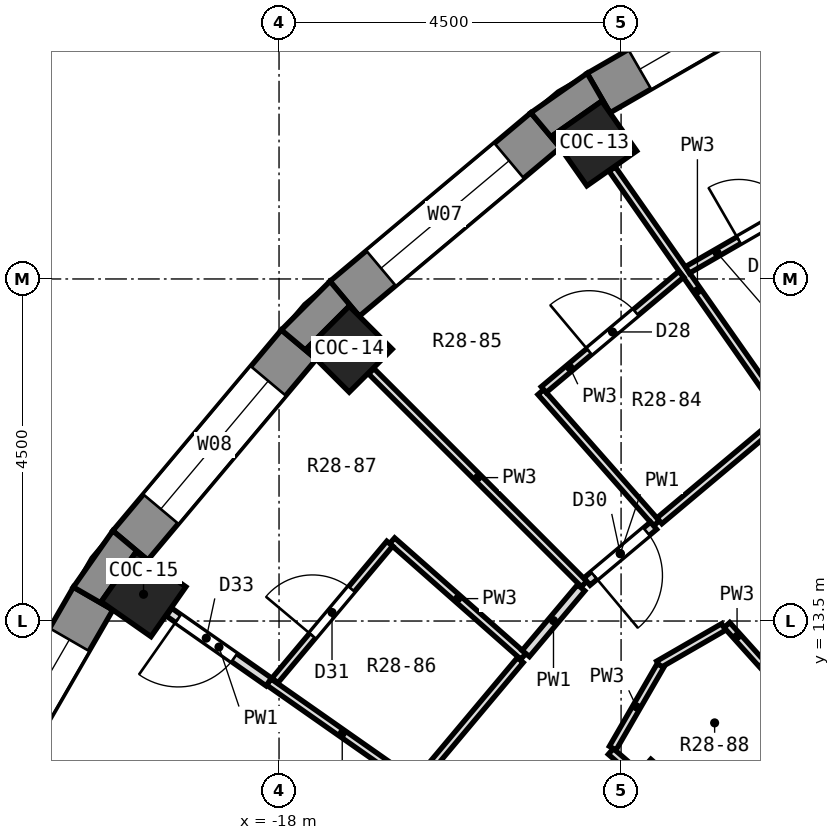
"""IFC4 building model, lengths in metres.
Left out: names, types, materials, properties, quantities, classifications, styles, units other than length and angle.
Written with IfcOpenShell. Run it as: python <this file> out.ifc"""

import sys

from ifc_helpers import new_model, si_unit, direction, frame, frame_2d, origin, origin_2d, place, context, subcontext, project, spatial, polyline, rectangle, outline, extrude, element, fill, save


model = new_model("IFC4")
c1 = context("Model", 3, precision=1e-05, world=origin(), true_north=direction((0.0, 1.0)))
c2 = subcontext(c1, "Body", "Model", "MODEL_VIEW")
j1 = project(units=[si_unit("LENGTHUNIT", "METRE"), si_unit("PLANEANGLEUNIT", "RADIAN")], contexts=[c1])
p1 = place(None, origin())
s1 = spatial("IfcSite", under=j1, at=p1, CompositionType="ELEMENT")
p2 = place(p1, origin())
s2 = spatial("IfcBuilding", under=s1, at=p2, CompositionType="ELEMENT")
p3 = place(p2, frame((0.0, 0.0, 190.5)))
s3 = spatial("IfcBuildingStorey", under=s2, at=p3, CompositionType="ELEMENT", Elevation=190.5)
for number, where, z_axis, x_axis in (
    (1, (-13.852, 19.782, 0.0), (0.0, 0.0, 1.0), (-0.574, 0.819, 0.0)),
    (2, (-17.077, 17.077, 0.0), (0.0, 0.0, 1.0), (-0.707, 0.707, 0.0)),
    (3, (-19.782, 13.852, 0.0), (0.0, 0.0, 1.0), (-0.819, 0.574, 0.0)),
):
    element("IfcColumn", number, at=place(p3, frame(where, z_axis=z_axis, x_axis=x_axis)), inside=s3, PredefinedType="COLUMN", context=c2, shape_type="SweptSolid", body=[
        extrude(rectangle(XDim=0.8, YDim=0.8, at=origin_2d()), origin(), (0.0, 0.0, 1.0), 3.3),
    ])
p4 = place(p3, frame((-10.809, 22.171, 0.0), z_axis=(0.0, 0.0, 1.0), x_axis=(-0.86602648383, -0.499998129301, 0.0)))
e4 = element("IfcWall", 4, at=p4, inside=s3, PredefinedType="SOLIDWALL", context=c2, shape_type="SweptSolid", body=[
    extrude(rectangle(XDim=3.45, YDim=0.6, at=frame_2d((1.725, 0.0))), origin(), (0.0, 0.0, 1.0), 2.85),
])
p5 = place(p4, frame((0.625, 0.0, 0.9)))
e5 = element("IfcOpeningElement", 5, at=p5, cuts=e4, PredefinedType="OPENING", context=c2, shape_type="SweptSolid", body=[
    extrude(rectangle(XDim=2.2, YDim=1.8, at=frame_2d((1.1, 0.9))), frame((0.0, 0.312, 0.0), z_axis=(0.0, -1.0, 0.0), x_axis=(1.0, 0.0, 0.0)), (0.0, 0.0, 1.0), 0.624),
])
p6 = place(p3, frame((-14.494, 19.957, 0.0), z_axis=(0.0, 0.0, 1.0), x_axis=(-0.766058884809, -0.642770398358, 0.0)))
e6 = element("IfcWall", 6, at=p6, inside=s3, PredefinedType="SOLIDWALL", context=c2, shape_type="SweptSolid", body=[
    extrude(rectangle(XDim=3.449, YDim=0.6, at=frame_2d((1.725, 0.0))), origin(), (0.0, 0.0, 1.0), 2.85),
])
p7 = place(p6, frame((0.625, 0.0, 0.9)))
e7 = element("IfcOpeningElement", 7, at=p7, cuts=e6, PredefinedType="OPENING", context=c2, shape_type="SweptSolid", body=[
    extrude(rectangle(XDim=2.2, YDim=1.8, at=frame_2d((1.1, 0.9))), frame((0.0, 0.312, 0.0), z_axis=(0.0, -1.0, 0.0), x_axis=(1.0, 0.0, 0.0)), (0.0, 0.0, 1.0), 0.624),
])
p8 = place(p3, frame((-17.74, 17.137, 0.0), z_axis=(0.0, 0.0, 1.0), x_axis=(-0.642770398358, -0.766058884809, 0.0)))
e8 = element("IfcWall", 8, at=p8, inside=s3, PredefinedType="SOLIDWALL", context=c2, shape_type="SweptSolid", body=[
    extrude(rectangle(XDim=3.449, YDim=0.6, at=frame_2d((1.725, 0.0))), origin(), (0.0, 0.0, 1.0), 2.85),
])
p9 = place(p8, frame((0.625, 0.0, 0.9)))
e9 = element("IfcOpeningElement", 9, at=p9, cuts=e8, PredefinedType="OPENING", context=c2, shape_type="SweptSolid", body=[
    extrude(rectangle(XDim=2.2, YDim=1.8, at=frame_2d((1.1, 0.9))), frame((0.0, 0.312, 0.0), z_axis=(0.0, -1.0, 0.0), x_axis=(1.0, 0.0, 0.0)), (0.0, 0.0, 1.0), 0.624),
])
p10 = place(p3, frame((-20.446, 13.796, 0.0), z_axis=(0.0, 0.0, 1.0), x_axis=(-0.499998129301, -0.86602648383, 0.0)))
e10 = element("IfcWall", 10, at=p10, inside=s3, PredefinedType="SOLIDWALL", context=c2, shape_type="SweptSolid", body=[
    extrude(rectangle(XDim=3.45, YDim=0.6, at=frame_2d((1.725, 0.0))), origin(), (0.0, 0.0, 1.0), 2.85),
])
p11 = place(p10, frame((0.625, 0.0, 0.9)))
e11 = element("IfcOpeningElement", 11, at=p11, cuts=e10, PredefinedType="OPENING", context=c2, shape_type="SweptSolid", body=[
    extrude(rectangle(XDim=2.2, YDim=1.8, at=frame_2d((1.1, 0.9))), frame((0.0, 0.312, 0.0), z_axis=(0.0, -1.0, 0.0), x_axis=(1.0, 0.0, 0.0)), (0.0, 0.0, 1.0), 0.624),
])
p12 = place(p3, origin())
e12 = element("IfcWall", 12, at=p12, inside=s3, PredefinedType="SOLIDWALL", context=c2, shape_type="SweptSolid", body=[
    extrude(outline(polyline([(-13.946, 20.706), (-14.687, 20.187), (-14.302, 19.727), (-14.409, 19.881), (-13.754, 20.34), (-13.646, 20.186), (-13.946, 20.706)])), origin(), (0.0, 0.0, 1.0), 2.85),
])
p13 = place(p3, origin())
e13 = element("IfcWall", 13, at=p13, inside=s3, PredefinedType="SOLIDWALL", context=c2, shape_type="SweptSolid", body=[
    extrude(outline(polyline([(-17.969, 17.33), (-17.51, 16.944), (-17.642, 17.077), (-17.077, 17.642), (-16.944, 17.51), (-17.33, 17.969), (-17.969, 17.33)])), origin(), (0.0, 0.0, 1.0), 2.85),
])
p14 = place(p3, origin())
e14 = element("IfcWall", 14, at=p14, inside=s3, PredefinedType="SOLIDWALL", context=c2, shape_type="SweptSolid", body=[
    extrude(outline(polyline([(-20.187, 14.687), (-20.706, 13.946), (-20.186, 13.646), (-20.34, 13.754), (-19.881, 14.409), (-19.727, 14.302), (-20.187, 14.687)])), origin(), (0.0, 0.0, 1.0), 2.85),
])
p15 = place(p3, frame((-13.617, 19.447, 0.0), z_axis=(0.0, 0.0, 1.0), x_axis=(0.573546149397, -0.819173250608, 0.0)))
e15 = element("IfcWall", 15, at=p15, inside=s3, PredefinedType="PARTITIONING", context=c2, shape_type="SweptSolid", body=[
    extrude(rectangle(XDim=3.91, YDim=0.1, at=frame_2d((1.955, 0.0))), origin(), (0.0, 0.0, 1.0), 2.85),
])
p16 = place(p3, frame((-14.556, 16.512, 0.0), z_axis=(0.0, 0.0, 1.0), x_axis=(0.661368963491, -0.750060726962, 0.0)))
e16 = element("IfcWall", 16, at=p16, inside=s3, PredefinedType="PARTITIONING", context=c2, shape_type="SweptSolid", body=[
    extrude(rectangle(XDim=2.301, YDim=0.1, at=frame_2d((1.151, 0.0))), origin(), (0.0, 0.0, 1.0), 2.85),
])
p17 = place(p3, frame((-12.108, 13.447, 0.0), z_axis=(0.0, 0.0, 1.0), x_axis=(0.669048883613, -0.743218400833, 0.0)))
e17 = element("IfcWall", 17, at=p17, inside=s3, PredefinedType="PARTITIONING", context=c2, shape_type="SweptSolid", body=[
    extrude(rectangle(XDim=2.084, YDim=0.1, at=frame_2d((1.042, 0.0))), origin(), (0.0, 0.0, 1.0), 2.85),
])
p18 = place(p17, frame((0.673, 0.0, 0.0)))
e18 = element("IfcOpeningElement", 18, at=p18, cuts=e17, PredefinedType="OPENING", context=c2, shape_type="SweptSolid", body=[
    extrude(rectangle(XDim=0.8, YDim=2.1, at=frame_2d((0.4, 1.05))), frame((0.0, 0.062, 0.0), z_axis=(0.0, -1.0, 0.0), x_axis=(1.0, 0.0, 0.0)), (0.0, 0.0, 1.0), 0.124),
])
p19 = place(p3, frame((-16.787, 16.787, 0.0), z_axis=(0.0, 0.0, 1.0), x_axis=(0.707106781187, -0.707106781187, 0.0)))
e19 = element("IfcWall", 19, at=p19, inside=s3, PredefinedType="PARTITIONING", context=c2, shape_type="SweptSolid", body=[
    extrude(rectangle(XDim=3.959, YDim=0.1, at=frame_2d((1.979, 0.0))), origin(), (0.0, 0.0, 1.0), 2.85),
])
p20 = place(p3, frame((-13.15, 11.634, 0.0), z_axis=(0.0, 0.0, 1.0), x_axis=(0.748945343294, -0.662631777655, 0.0)))
e20 = element("IfcWall", 20, at=p20, inside=s3, PredefinedType="PARTITIONING", context=c2, shape_type="SweptSolid", body=[
    extrude(rectangle(XDim=1.638, YDim=0.125, at=frame_2d((0.819, 0.0))), origin(), (0.0, 0.0, 1.0), 2.85),
])
p21 = place(p3, frame((-16.512, 14.556, 0.0), z_axis=(0.0, 0.0, 1.0), x_axis=(0.750060726962, -0.661368963491, 0.0)))
e21 = element("IfcWall", 21, at=p21, inside=s3, PredefinedType="PARTITIONING", context=c2, shape_type="SweptSolid", body=[
    extrude(rectangle(XDim=2.301, YDim=0.1, at=frame_2d((1.151, 0.0))), origin(), (0.0, 0.0, 1.0), 2.85),
])
p22 = place(p3, frame((-13.635, 11.784, 0.0), z_axis=(0.0, 0.0, 1.0), x_axis=(0.75671861177, -0.653740730413, 0.0)))
e22 = element("IfcWall", 22, at=p22, inside=s3, PredefinedType="PARTITIONING", context=c2, shape_type="SweptSolid", body=[
    extrude(rectangle(XDim=0.578, YDim=0.1, at=frame_2d((0.289, 0.0))), origin(), (0.0, 0.0, 1.0), 2.85),
])
p23 = place(p3, frame((-18.135, 12.699, 0.0), z_axis=(0.0, 0.0, 1.0), x_axis=(0.818979032307, -0.573823443789, 0.0)))
e23 = element("IfcWall", 23, at=p23, inside=s3, PredefinedType="PARTITIONING", context=c2, shape_type="SweptSolid", body=[
    extrude(rectangle(XDim=2.359, YDim=0.1, at=frame_2d((1.18, 0.0))), origin(), (0.0, 0.0, 1.0), 2.85),
])
p24 = place(p3, frame((-19.447, 13.617, 0.0), z_axis=(0.0, 0.0, 1.0), x_axis=(0.819188933795, -0.57352374907, 0.0)))
e24 = element("IfcWall", 24, at=p24, inside=s3, PredefinedType="PARTITIONING", context=c2, shape_type="SweptSolid", body=[
    extrude(rectangle(XDim=1.601, YDim=0.125, at=frame_2d((0.801, 0.0))), origin(), (0.0, 0.0, 1.0), 2.85),
])
p25 = place(p24, frame((0.147, 0.0, 0.0)))
e25 = element("IfcOpeningElement", 25, at=p25, cuts=e24, PredefinedType="OPENING", context=c2, shape_type="SweptSolid", body=[
    extrude(rectangle(XDim=0.9, YDim=2.1, at=frame_2d((0.45, 1.05))), frame((0.0, 0.074, 0.0), z_axis=(0.0, -1.0, 0.0), x_axis=(1.0, 0.0, 0.0)), (0.0, 0.0, 1.0), 0.149),
])
p26 = place(p3, frame((-13.007, 12.928, 0.0), z_axis=(0.0, 0.0, 1.0), x_axis=(0.86609095339, 0.499886447563, 0.0)))
e26 = element("IfcWall", 26, at=p26, inside=s3, PredefinedType="PARTITIONING", context=c2, shape_type="SweptSolid", body=[
    extrude(rectangle(XDim=0.988, YDim=0.1, at=frame_2d((0.494, 0.0))), origin(), (0.0, 0.0, 1.0), 2.85),
])
p27 = place(p3, frame((-12.627, 18.119, 0.0), z_axis=(0.0, 0.0, 1.0), x_axis=(0.865982457891, 0.500074377092, 0.0)))
e27 = element("IfcWall", 27, at=p27, inside=s3, PredefinedType="PARTITIONING", context=c2, shape_type="SweptSolid", body=[
    extrude(rectangle(XDim=2.362, YDim=0.1, at=frame_2d((1.181, 0.0))), origin(), (0.0, 0.0, 1.0), 2.85),
])
p28 = place(p27, frame((0.781, 0.0, 0.0)))
e28 = element("IfcOpeningElement", 28, at=p28, cuts=e27, PredefinedType="OPENING", context=c2, shape_type="SweptSolid", body=[
    extrude(rectangle(XDim=0.8, YDim=2.1, at=frame_2d((0.4, 1.05))), frame((0.0, 0.062, 0.0), z_axis=(0.0, -1.0, 0.0), x_axis=(1.0, 0.0, 0.0)), (0.0, 0.0, 1.0), 0.124),
])
p29 = place(p3, frame((-12.996, 14.818, 0.0), z_axis=(0.0, 0.0, 1.0), x_axis=(0.766068087891, 0.642759429892, 0.0)))
e29 = element("IfcWall", 29, at=p29, inside=s3, PredefinedType="PARTITIONING", context=c2, shape_type="SweptSolid", body=[
    extrude(rectangle(XDim=2.105, YDim=0.1, at=frame_2d((1.052, 0.0))), origin(), (0.0, 0.0, 1.0), 2.85),
])
p30 = place(p3, frame((-13.949, 14.019, 0.0), z_axis=(0.0, 0.0, 1.0), x_axis=(0.766293239505, 0.642490989111, 0.0)))
e30 = element("IfcWall", 30, at=p30, inside=s3, PredefinedType="PARTITIONING", context=c2, shape_type="SweptSolid", body=[
    extrude(rectangle(XDim=1.144, YDim=0.125, at=frame_2d((0.572, 0.0))), origin(), (0.0, 0.0, 1.0), 2.85),
])
p31 = place(p30, frame((0.122, 0.0, 0.0)))
e31 = element("IfcOpeningElement", 31, at=p31, cuts=e30, PredefinedType="OPENING", context=c2, shape_type="SweptSolid", body=[
    extrude(rectangle(XDim=0.9, YDim=2.1, at=frame_2d((0.45, 1.05))), frame((0.0, 0.074, 0.0), z_axis=(0.0, -1.0, 0.0), x_axis=(1.0, 0.0, 0.0)), (0.0, 0.0, 1.0), 0.149),
])
p32 = place(p3, frame((-14.518, 16.544, 0.0), z_axis=(0.0, 0.0, 1.0), x_axis=(0.766175122772, 0.642631839583, 0.0)))
e32 = element("IfcWall", 32, at=p32, inside=s3, PredefinedType="PARTITIONING", context=c2, shape_type="SweptSolid", body=[
    extrude(rectangle(XDim=2.362, YDim=0.1, at=frame_2d((1.181, 0.0))), origin(), (0.0, 0.0, 1.0), 2.85),
])
p33 = place(p32, frame((0.781, 0.0, 0.0)))
e33 = element("IfcOpeningElement", 33, at=p33, cuts=e32, PredefinedType="OPENING", context=c2, shape_type="SweptSolid", body=[
    extrude(rectangle(XDim=0.8, YDim=2.1, at=frame_2d((0.4, 1.05))), frame((0.0, 0.062, 0.0), z_axis=(0.0, -1.0, 0.0), x_axis=(1.0, 0.0, 0.0)), (0.0, 0.0, 1.0), 0.124),
])
p34 = place(p3, frame((-14.754, 13.072, 0.0), z_axis=(0.0, 0.0, 1.0), x_axis=(0.644208847233, 0.76484963303, 0.0)))
e34 = element("IfcWall", 34, at=p34, inside=s3, PredefinedType="PARTITIONING", context=c2, shape_type="SweptSolid", body=[
    extrude(rectangle(XDim=1.131, YDim=0.125, at=frame_2d((0.566, 0.0))), origin(), (0.0, 0.0, 1.0), 2.85),
])
p35 = place(p3, frame((-16.169, 11.385, 0.0), z_axis=(0.0, 0.0, 1.0), x_axis=(0.642720670629, 0.766100606674, 0.0)))
e35 = element("IfcWall", 35, at=p35, inside=s3, PredefinedType="PARTITIONING", context=c2, shape_type="SweptSolid", body=[
    extrude(rectangle(XDim=2.09, YDim=0.1, at=frame_2d((1.045, 0.0))), origin(), (0.0, 0.0, 1.0), 2.85),
])
p36 = place(p3, frame((-18.054, 12.718, 0.0), z_axis=(0.0, 0.0, 1.0), x_axis=(0.642675237257, 0.76613872074, 0.0)))
e36 = element("IfcWall", 36, at=p36, inside=s3, PredefinedType="PARTITIONING", context=c2, shape_type="SweptSolid", body=[
    extrude(rectangle(XDim=2.349, YDim=0.1, at=frame_2d((1.175, 0.0))), origin(), (0.0, 0.0, 1.0), 2.85),
])
p37 = place(p36, frame((0.768, 0.0, 0.0)))
e37 = element("IfcOpeningElement", 37, at=p37, cuts=e36, PredefinedType="OPENING", context=c2, shape_type="SweptSolid", body=[
    extrude(rectangle(XDim=0.8, YDim=2.1, at=frame_2d((0.4, 1.05))), frame((0.0, 0.062, 0.0), z_axis=(0.0, -1.0, 0.0), x_axis=(1.0, 0.0, 0.0)), (0.0, 0.0, 1.0), 0.124),
])
p38 = place(p3, frame((-13.61, 11.827, 0.0), z_axis=(0.0, 0.0, 1.0), x_axis=(0.500407250634, 0.865790149813, 0.0)))
e38 = element("IfcWall", 38, at=p38, inside=s3, PredefinedType="PARTITIONING", context=c2, shape_type="SweptSolid", body=[
    extrude(rectangle(XDim=1.255, YDim=0.1, at=frame_2d((0.627, 0.0))), origin(), (0.0, 0.0, 1.0), 2.85),
])
p39 = place(p5, origin())
e39 = element("IfcWindow", 39, at=p39, inside=s3, PartitioningType="SINGLE_PANEL", PredefinedType="WINDOW", context=c2, shape_type="SweptSolid", body=[
    extrude(rectangle(XDim=2.2, YDim=1.8, at=frame_2d((1.1, 0.9))), frame((0.0, 0.18, 0.0), z_axis=(0.0, -1.0, 0.0), x_axis=(1.0, 0.0, 0.0)), (0.0, 0.0, 1.0), 0.06),
])
fill(e5, e39)
p40 = place(p7, origin())
e40 = element("IfcWindow", 40, at=p40, inside=s3, PartitioningType="SINGLE_PANEL", PredefinedType="WINDOW", context=c2, shape_type="SweptSolid", body=[
    extrude(rectangle(XDim=2.2, YDim=1.8, at=frame_2d((1.1, 0.9))), frame((0.0, 0.18, 0.0), z_axis=(0.0, -1.0, 0.0), x_axis=(1.0, 0.0, 0.0)), (0.0, 0.0, 1.0), 0.06),
])
fill(e7, e40)
p41 = place(p9, origin())
e41 = element("IfcWindow", 41, at=p41, inside=s3, PartitioningType="SINGLE_PANEL", PredefinedType="WINDOW", context=c2, shape_type="SweptSolid", body=[
    extrude(rectangle(XDim=2.2, YDim=1.8, at=frame_2d((1.1, 0.9))), frame((0.0, 0.18, 0.0), z_axis=(0.0, -1.0, 0.0), x_axis=(1.0, 0.0, 0.0)), (0.0, 0.0, 1.0), 0.06),
])
fill(e9, e41)
p42 = place(p11, origin())
e42 = element("IfcWindow", 42, at=p42, inside=s3, PartitioningType="SINGLE_PANEL", PredefinedType="WINDOW", context=c2, shape_type="SweptSolid", body=[
    extrude(rectangle(XDim=2.2, YDim=1.8, at=frame_2d((1.1, 0.9))), frame((0.0, 0.18, 0.0), z_axis=(0.0, -1.0, 0.0), x_axis=(1.0, 0.0, 0.0)), (0.0, 0.0, 1.0), 0.06),
])
fill(e11, e42)
p43 = place(p28, origin())
e43 = element("IfcDoor", 43, at=p43, inside=s3, OperationType="SINGLE_SWING_LEFT", PredefinedType="DOOR", context=c2, shape_type="SweptSolid", body=[
    extrude(rectangle(XDim=0.8, YDim=2.1, at=frame_2d((0.4, 1.05))), frame((0.0, 0.025, 0.0), z_axis=(0.0, -1.0, 0.0), x_axis=(1.0, 0.0, 0.0)), (0.0, 0.0, 1.0), 0.05),
])
fill(e28, e43)
p44 = place(p33, origin())
e44 = element("IfcDoor", 44, at=p44, inside=s3, OperationType="SINGLE_SWING_LEFT", PredefinedType="DOOR", context=c2, shape_type="SweptSolid", body=[
    extrude(rectangle(XDim=0.8, YDim=2.1, at=frame_2d((0.4, 1.05))), frame((0.0, 0.025, 0.0), z_axis=(0.0, -1.0, 0.0), x_axis=(1.0, 0.0, 0.0)), (0.0, 0.0, 1.0), 0.05),
])
fill(e33, e44)
p45 = place(p18, origin())
e45 = element("IfcDoor", 45, at=p45, inside=s3, OperationType="SINGLE_SWING_RIGHT", PredefinedType="DOOR", context=c2, shape_type="SweptSolid", body=[
    extrude(rectangle(XDim=0.8, YDim=2.1, at=frame_2d((0.4, 1.05))), frame((0.0, 0.025, 0.0), z_axis=(0.0, -1.0, 0.0), x_axis=(1.0, 0.0, 0.0)), (0.0, 0.0, 1.0), 0.05),
])
fill(e18, e45)
p46 = place(p31, frame((0.9, 0.0, 0.0), z_axis=(0.0, 0.0, 1.0), x_axis=(-1.0, 0.0, 0.0)))
e46 = element("IfcDoor", 46, at=p46, inside=s3, OperationType="SINGLE_SWING_RIGHT", PredefinedType="DOOR", context=c2, shape_type="SweptSolid", body=[
    extrude(rectangle(XDim=0.9, YDim=2.1, at=frame_2d((0.45, 1.05))), frame((0.0, 0.025, 0.0), z_axis=(0.0, -1.0, 0.0), x_axis=(1.0, 0.0, 0.0)), (0.0, 0.0, 1.0), 0.05),
])
fill(e31, e46)
p47 = place(p37, origin())
e47 = element("IfcDoor", 47, at=p47, inside=s3, OperationType="SINGLE_SWING_LEFT", PredefinedType="DOOR", context=c2, shape_type="SweptSolid", body=[
    extrude(rectangle(XDim=0.8, YDim=2.1, at=frame_2d((0.4, 1.05))), frame((0.0, 0.025, 0.0), z_axis=(0.0, -1.0, 0.0), x_axis=(1.0, 0.0, 0.0)), (0.0, 0.0, 1.0), 0.05),
])
fill(e37, e47)
p48 = place(p25, frame((0.9, 0.0, 0.0), z_axis=(0.0, 0.0, 1.0), x_axis=(-1.0, 0.0, 0.0)))
e48 = element("IfcDoor", 48, at=p48, inside=s3, OperationType="SINGLE_SWING_RIGHT", PredefinedType="DOOR", context=c2, shape_type="SweptSolid", body=[
    extrude(rectangle(XDim=0.9, YDim=2.1, at=frame_2d((0.45, 1.05))), frame((0.0, 0.025, 0.0), z_axis=(0.0, -1.0, 0.0), x_axis=(1.0, 0.0, 0.0)), (0.0, 0.0, 1.0), 0.05),
])
fill(e25, e48)
save(model, sys.argv[1])
